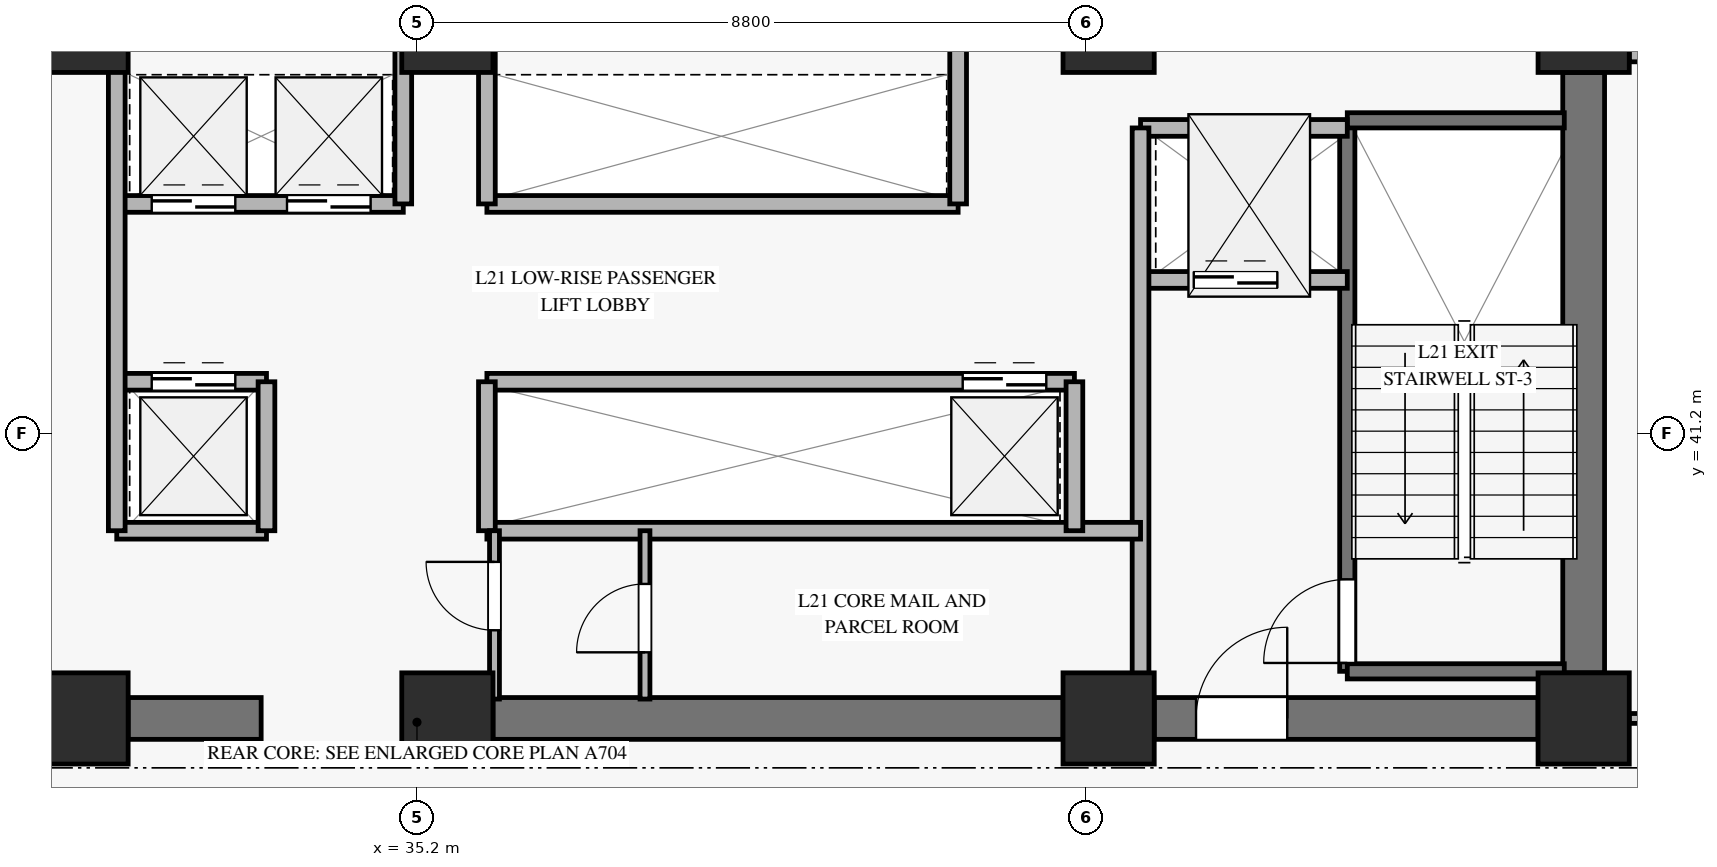
"""IFC4 building model, lengths in metres.
Left out: names, types, materials, properties, quantities, classifications, styles, units other than length and angle.
Written with IfcOpenShell. Run it as: python <this file> out.ifc"""

import sys

from ifc_helpers import new_model, si_unit, direction, frame, frame_2d, origin, origin_2d, place, context, subcontext, project, spatial, rectangle, extrude, source, transform, mapped, element, fill, save


model = new_model("IFC4")
c1 = context("Model", 3, precision=1e-05, world=origin(), true_north=direction((0.0, 1.0)))
c2 = subcontext(c1, "Body", "Model", "MODEL_VIEW")
j1 = project(units=[si_unit("LENGTHUNIT", "METRE"), si_unit("PLANEANGLEUNIT", "RADIAN")], contexts=[c1])
p1 = place(None, origin())
s1 = spatial("IfcSite", under=j1, at=p1, CompositionType="ELEMENT")
p2 = place(p1, origin())
s2 = spatial("IfcBuilding", under=s1, at=p2, CompositionType="ELEMENT")
p3 = place(p2, frame((0.0, 0.0, 87.4)))
s3 = spatial("IfcBuildingStorey", under=s2, at=p3, CompositionType="ELEMENT", Elevation=87.4)
m1 = source(origin(), c2, "Body", "SweptSolid", [
    extrude(rectangle(XDim=1.2, YDim=1.2, at=origin_2d()), origin(), (0.0, 0.0, 1.0), 3.68),
])
for number, where, z_axis, x_axis in (
    (1, (30.8, 37.45, 0.0), (0.0, 0.0, 1.0), (1.0, 0.0, 0.0)),
    (2, (30.8, 46.55, 0.0), (0.0, 0.0, 1.0), (1.0, 0.0, 0.0)),
    (3, (35.6, 37.45, 0.0), (0.0, 0.0, 1.0), (1.0, 0.0, 0.0)),
    (4, (35.6, 46.55, 0.0), (0.0, 0.0, 1.0), (1.0, 0.0, 0.0)),
    (5, (44.3, 37.45, 0.0), (0.0, 0.0, 1.0), (1.0, 0.0, 0.0)),
    (6, (44.3, 46.55, 0.0), (0.0, 0.0, 1.0), (1.0, 0.0, 0.0)),
    (7, (50.55, 37.45, 0.0), (0.0, 0.0, 1.0), (1.0, 0.0, 0.0)),
    (8, (50.55, 46.55, 0.0), (0.0, 0.0, 1.0), (1.0, 0.0, 0.0)),
):
    element("IfcColumn", number, at=place(p3, frame(where, z_axis=z_axis, x_axis=x_axis)), inside=s3, PredefinedType="PILASTER", context=c2, shape_type="MappedRepresentation", body=[
        mapped(m1, transform((0.0, 0.0, 0.0), x_axis=(1.0, 0.0, 0.0), y_axis=(0.0, 1.0, 0.0), z_axis=(0.0, 0.0, 1.0), scale=1.0)),
    ])
p4 = place(p3, frame((31.4, 37.45, 0.0), z_axis=(0.0, 0.0, 1.0), x_axis=(1.0, 0.0, 0.0)))
e9 = element("IfcWall", 9, at=p4, inside=s3, PredefinedType="SHEAR", context=c2, shape_type="SweptSolid", body=[
    extrude(rectangle(XDim=1.75, YDim=0.55, at=frame_2d((0.875, 0.0))), origin(), (0.0, 0.0, 1.0), 3.68),
])
p5 = place(p3, frame((36.2, 37.45, 0.0), z_axis=(0.0, 0.0, 1.0), x_axis=(1.0, 0.0, 0.0)))
e10 = element("IfcWall", 10, at=p5, inside=s3, PredefinedType="SHEAR", context=c2, shape_type="SweptSolid", body=[
    extrude(rectangle(XDim=7.5, YDim=0.55, at=frame_2d((3.75, 0.0))), origin(), (0.0, 0.0, 1.0), 3.68),
])
p6 = place(p3, frame((44.9, 37.45, 0.0), z_axis=(0.0, 0.0, 1.0), x_axis=(1.0, 0.0, 0.0)))
e11 = element("IfcWall", 11, at=p6, inside=s3, PredefinedType="SHEAR", context=c2, shape_type="SweptSolid", body=[
    extrude(rectangle(XDim=5.05, YDim=0.55, at=frame_2d((2.525, 0.0))), origin(), (0.0, 0.0, 1.0), 3.68),
])
p7 = place(p6, frame((0.55, 0.0, 0.0)))
e12 = element("IfcOpeningElement", 12, at=p7, cuts=e11, PredefinedType="OPENING", context=c2, shape_type="SweptSolid", body=[
    extrude(rectangle(XDim=1.2, YDim=2.15, at=frame_2d((0.6, 1.075))), frame((0.0, 0.285, 0.0), z_axis=(0.0, -1.0, 0.0), x_axis=(1.0, 0.0, 0.0)), (0.0, 0.0, 1.0), 0.57),
])
p8 = place(p3, frame((50.55, 38.05, 0.0), z_axis=(0.0, 0.0, 1.0), x_axis=(0.0, 1.0, 0.0)))
e13 = element("IfcWall", 13, at=p8, inside=s3, PredefinedType="SHEAR", context=c2, shape_type="SweptSolid", body=[
    extrude(rectangle(XDim=7.9, YDim=0.55, at=frame_2d((3.95, 0.0))), origin(), (0.0, 0.0, 1.0), 3.68),
])
p9 = place(p3, frame((51.15, 46.25, 0.0), z_axis=(0.0, 0.0, 1.0), x_axis=(1.0, 0.0, 0.0)))
e14 = element("IfcWall", 14, at=p9, inside=s3, PredefinedType="SOLIDWALL", context=c2, shape_type="SweptSolid", body=[
    extrude(rectangle(XDim=11.406, YDim=0.32, at=frame_2d((5.703, 0.0))), origin(), (0.0, 0.0, 1.0), 3.16),
])
p10 = place(p9, frame((4.903, 0.0, 0.45)))
e15 = element("IfcOpeningElement", 15, at=p10, cuts=e14, PredefinedType="OPENING", context=c2, shape_type="SweptSolid", body=[
    extrude(rectangle(XDim=1.6, YDim=2.0, at=frame_2d((0.8, 1.0))), frame((0.0, 0.17, 0.0), z_axis=(0.0, -1.0, 0.0), x_axis=(1.0, 0.0, 0.0)), (0.0, 0.0, 1.0), 0.34),
])
p11 = place(p3, frame((47.44, 38.07, 0.0), z_axis=(0.0, 0.0, 1.0), x_axis=(0.0, 1.0, 0.0)))
e16 = element("IfcWall", 16, at=p11, inside=s3, PredefinedType="SOLIDWALL", context=c2, shape_type="SweptSolid", body=[
    extrude(rectangle(XDim=7.25, YDim=0.2, at=frame_2d((3.625, 0.0))), origin(), (0.0, 0.0, 1.0), 3.9),
])
p12 = place(p11, frame((0.11, 0.0, 0.0)))
e17 = element("IfcOpeningElement", 17, at=p12, cuts=e16, PredefinedType="OPENING", context=c2, shape_type="SweptSolid", body=[
    extrude(rectangle(XDim=1.1, YDim=2.15, at=frame_2d((0.55, 1.075))), frame((0.0, 0.11, 0.0), z_axis=(0.0, -1.0, 0.0), x_axis=(1.0, 0.0, 0.0)), (0.0, 0.0, 1.0), 0.22),
])
for number, where, z_axis, x_axis in (
    (18, (47.44, 45.32, 0.0), (0.0, 0.0, 1.0), (1.0, 0.0, 0.0)),
    (19, (47.44, 38.07, 0.0), (0.0, 0.0, 1.0), (1.0, 0.0, 0.0)),
):
    element("IfcWall", number, at=place(p3, frame(where, z_axis=z_axis, x_axis=x_axis)), inside=s3, PredefinedType="SOLIDWALL", context=c2, shape_type="SweptSolid", body=[
        extrude(rectangle(XDim=2.855, YDim=0.2, at=frame_2d((1.427, 0.0))), origin(), (0.0, 0.0, 1.0), 3.9),
    ])
p13 = place(p3, frame((44.72, 43.22, 0.0), z_axis=(0.0, 0.0, 1.0), x_axis=(1.0, 0.0, 0.0)))
e20 = element("IfcWall", 20, at=p13, inside=s3, PredefinedType="SOLIDWALL", context=c2, shape_type="SweptSolid", body=[
    extrude(rectangle(XDim=2.72, YDim=0.22, at=frame_2d((1.36, 0.0))), origin(), (0.0, 0.0, 1.0), 3.68),
])
p14 = place(p13, frame((0.7, 0.0, 0.0)))
e21 = element("IfcOpeningElement", 21, at=p14, cuts=e20, PredefinedType="OPENING", context=c2, shape_type="SweptSolid", body=[
    extrude(rectangle(XDim=1.1, YDim=2.2, at=frame_2d((0.55, 1.1))), frame((0.0, 0.12, 0.0), z_axis=(0.0, -1.0, 0.0), x_axis=(1.0, 0.0, 0.0)), (0.0, 0.0, 1.0), 0.24),
])
p15 = place(p3, frame((44.72, 45.22, 0.0), z_axis=(0.0, 0.0, 1.0), x_axis=(1.0, 0.0, 0.0)))
e22 = element("IfcWall", 22, at=p15, inside=s3, PredefinedType="SOLIDWALL", context=c2, shape_type="SweptSolid", body=[
    extrude(rectangle(XDim=2.72, YDim=0.22, at=frame_2d((1.36, 0.0))), origin(), (0.0, 0.0, 1.0), 3.68),
])
p16 = place(p3, frame((44.72, 37.705, 0.0), z_axis=(0.0, 0.0, 1.0), x_axis=(0.0, 1.0, 0.0)))
e23 = element("IfcWall", 23, at=p16, inside=s3, PredefinedType="SOLIDWALL", context=c2, shape_type="SweptSolid", body=[
    extrude(rectangle(XDim=7.515, YDim=0.22, at=frame_2d((3.757, 0.0))), origin(), (0.0, 0.0, 1.0), 3.68),
])
p17 = place(p3, frame((31.25, 44.22, 0.0), z_axis=(0.0, 0.0, 1.0), x_axis=(1.0, 0.0, 0.0)))
e24 = element("IfcWall", 24, at=p17, inside=s3, PredefinedType="SOLIDWALL", context=c2, shape_type="SweptSolid", body=[
    extrude(rectangle(XDim=3.77, YDim=0.22, at=frame_2d((1.885, 0.0))), origin(), (0.0, 0.0, 1.0), 3.68),
])
p18 = place(p17, frame((0.46, 0.0, 0.0)))
e25 = element("IfcOpeningElement", 25, at=p18, cuts=e24, PredefinedType="OPENING", context=c2, shape_type="SweptSolid", body=[
    extrude(rectangle(XDim=1.1, YDim=2.2, at=frame_2d((0.55, 1.1))), frame((0.0, 0.12, 0.0), z_axis=(0.0, -1.0, 0.0), x_axis=(1.0, 0.0, 0.0)), (0.0, 0.0, 1.0), 0.24),
])
p19 = place(p17, frame((2.24, 0.0, 0.0)))
e26 = element("IfcOpeningElement", 26, at=p19, cuts=e24, PredefinedType="OPENING", context=c2, shape_type="SweptSolid", body=[
    extrude(rectangle(XDim=1.1, YDim=2.2, at=frame_2d((0.55, 1.1))), frame((0.0, 0.12, 0.0), z_axis=(0.0, -1.0, 0.0), x_axis=(1.0, 0.0, 0.0)), (0.0, 0.0, 1.0), 0.24),
])
p20 = place(p3, frame((36.12, 44.22, 0.0), z_axis=(0.0, 0.0, 1.0), x_axis=(1.0, 0.0, 0.0)))
e27 = element("IfcWall", 27, at=p20, inside=s3, PredefinedType="SOLIDWALL", context=c2, shape_type="SweptSolid", body=[
    extrude(rectangle(XDim=6.2, YDim=0.22, at=frame_2d((3.1, 0.0))), origin(), (0.0, 0.0, 1.0), 3.68),
])
for number, where, z_axis, x_axis in (
    (28, (35.02, 44.22, 0.0), (0.0, 0.0, 1.0), (0.0, 1.0, 0.0)),
    (29, (36.12, 44.22, 0.0), (0.0, 0.0, 1.0), (0.0, 1.0, 0.0)),
    (30, (42.32, 44.22, 0.0), (0.0, 0.0, 1.0), (0.0, 1.0, 0.0)),
):
    element("IfcWall", number, at=place(p3, frame(where, z_axis=z_axis, x_axis=x_axis)), inside=s3, PredefinedType="SOLIDWALL", context=c2, shape_type="SweptSolid", body=[
        extrude(rectangle(XDim=2.075, YDim=0.22, at=frame_2d((1.038, 0.0))), origin(), (0.0, 0.0, 1.0), 3.68),
    ])
p21 = place(p3, frame((31.25, 41.88, 0.0), z_axis=(0.0, 0.0, 1.0), x_axis=(1.0, 0.0, 0.0)))
e31 = element("IfcWall", 31, at=p21, inside=s3, PredefinedType="SOLIDWALL", context=c2, shape_type="SweptSolid", body=[
    extrude(rectangle(XDim=1.97, YDim=0.22, at=frame_2d((0.985, 0.0))), origin(), (0.0, 0.0, 1.0), 3.68),
])
p22 = place(p21, frame((0.46, 0.0, 0.0)))
e32 = element("IfcOpeningElement", 32, at=p22, cuts=e31, PredefinedType="OPENING", context=c2, shape_type="SweptSolid", body=[
    extrude(rectangle(XDim=1.1, YDim=2.2, at=frame_2d((0.55, 1.1))), frame((0.0, 0.12, 0.0), z_axis=(0.0, -1.0, 0.0), x_axis=(1.0, 0.0, 0.0)), (0.0, 0.0, 1.0), 0.24),
])
p23 = place(p3, frame((36.12, 41.88, 0.0), z_axis=(0.0, 0.0, 1.0), x_axis=(1.0, 0.0, 0.0)))
e33 = element("IfcWall", 33, at=p23, inside=s3, PredefinedType="SOLIDWALL", context=c2, shape_type="SweptSolid", body=[
    extrude(rectangle(XDim=7.73, YDim=0.22, at=frame_2d((3.865, 0.0))), origin(), (0.0, 0.0, 1.0), 3.68),
])
p24 = place(p23, frame((6.26, 0.0, 0.0)))
e34 = element("IfcOpeningElement", 34, at=p24, cuts=e33, PredefinedType="OPENING", context=c2, shape_type="SweptSolid", body=[
    extrude(rectangle(XDim=1.1, YDim=2.2, at=frame_2d((0.55, 1.1))), frame((0.0, 0.12, 0.0), z_axis=(0.0, -1.0, 0.0), x_axis=(1.0, 0.0, 0.0)), (0.0, 0.0, 1.0), 0.24),
])
p25 = place(p3, frame((31.25, 39.92, 0.0), z_axis=(0.0, 0.0, 1.0), x_axis=(1.0, 0.0, 0.0)))
e35 = element("IfcWall", 35, at=p25, inside=s3, PredefinedType="SOLIDWALL", context=c2, shape_type="SweptSolid", body=[
    extrude(rectangle(XDim=1.97, YDim=0.22, at=frame_2d((0.985, 0.0))), origin(), (0.0, 0.0, 1.0), 3.68),
])
p26 = place(p3, frame((33.22, 39.92, 0.0), z_axis=(0.0, 0.0, 1.0), x_axis=(0.0, 1.0, 0.0)))
e36 = element("IfcWall", 36, at=p26, inside=s3, PredefinedType="SOLIDWALL", context=c2, shape_type="SweptSolid", body=[
    extrude(rectangle(XDim=1.96, YDim=0.22, at=frame_2d((0.98, 0.0))), origin(), (0.0, 0.0, 1.0), 3.68),
])
p27 = place(p3, frame((36.12, 39.92, 0.0), z_axis=(0.0, 0.0, 1.0), x_axis=(1.0, 0.0, 0.0)))
e37 = element("IfcWall", 37, at=p27, inside=s3, PredefinedType="SOLIDWALL", context=c2, shape_type="SweptSolid", body=[
    extrude(rectangle(XDim=8.6, YDim=0.22, at=frame_2d((4.3, 0.0))), origin(), (0.0, 0.0, 1.0), 2.965),
])
p28 = place(p3, frame((36.12, 39.92, 0.0), z_axis=(0.0, 0.0, 1.0), x_axis=(0.0, 1.0, 0.0)))
e38 = element("IfcWall", 38, at=p28, inside=s3, PredefinedType="SOLIDWALL", context=c2, shape_type="SweptSolid", body=[
    extrude(rectangle(XDim=1.96, YDim=0.22, at=frame_2d((0.98, 0.0))), origin(), (0.0, 0.0, 1.0), 3.68),
])
p29 = place(p3, frame((31.25, 39.92, 0.0), z_axis=(0.0, 0.0, 1.0), x_axis=(0.0, 1.0, 0.0)))
e39 = element("IfcWall", 39, at=p29, inside=s3, PredefinedType="SOLIDWALL", context=c2, shape_type="SweptSolid", body=[
    extrude(rectangle(XDim=6.375, YDim=0.22, at=frame_2d((3.188, 0.0))), origin(), (0.0, 0.0, 1.0), 3.68),
])
p30 = place(p3, frame((43.85, 39.92, 0.0), z_axis=(0.0, 0.0, 1.0), x_axis=(0.0, 1.0, 0.0)))
e40 = element("IfcWall", 40, at=p30, inside=s3, PredefinedType="SOLIDWALL", context=c2, shape_type="SweptSolid", body=[
    extrude(rectangle(XDim=1.96, YDim=0.22, at=frame_2d((0.98, 0.0))), origin(), (0.0, 0.0, 1.0), 3.68),
])
p31 = place(p3, frame((36.22, 37.705, 0.0), z_axis=(0.0, 0.0, 1.0), x_axis=(0.0, 1.0, 0.0)))
e41 = element("IfcWall", 41, at=p31, inside=s3, PredefinedType="PARTITIONING", context=c2, shape_type="SweptSolid", body=[
    extrude(rectangle(XDim=2.215, YDim=0.13, at=frame_2d((1.107, 0.0))), origin(), (0.0, 0.0, 1.0), 3.68),
])
p32 = place(p31, frame((0.905, 0.0, 0.0)))
e42 = element("IfcOpeningElement", 42, at=p32, cuts=e41, PredefinedType="OPENING", context=c2, shape_type="SweptSolid", body=[
    extrude(rectangle(XDim=0.9, YDim=2.1, at=frame_2d((0.45, 1.05))), frame((0.0, 0.075, 0.0), z_axis=(0.0, -1.0, 0.0), x_axis=(1.0, 0.0, 0.0)), (0.0, 0.0, 1.0), 0.15),
])
p33 = place(p3, frame((38.2, 37.705, 0.0), z_axis=(0.0, 0.0, 1.0), x_axis=(0.0, 1.0, 0.0)))
e43 = element("IfcWall", 43, at=p33, inside=s3, PredefinedType="PARTITIONING", context=c2, shape_type="SweptSolid", body=[
    extrude(rectangle(XDim=2.215, YDim=0.13, at=frame_2d((1.107, 0.0))), origin(), (0.0, 0.0, 1.0), 3.68),
])
p34 = place(p33, frame((0.615, 0.0, 0.0)))
e44 = element("IfcOpeningElement", 44, at=p34, cuts=e43, PredefinedType="OPENING", context=c2, shape_type="SweptSolid", body=[
    extrude(rectangle(XDim=0.9, YDim=2.1, at=frame_2d((0.45, 1.05))), frame((0.0, 0.075, 0.0), z_axis=(0.0, -1.0, 0.0), x_axis=(1.0, 0.0, 0.0)), (0.0, 0.0, 1.0), 0.15),
])
p35 = place(p3, frame((51.15, 37.45, 0.0), z_axis=(0.0, 0.0, 1.0), x_axis=(1.0, 0.0, 0.0)))
e45 = element("IfcWall", 45, at=p35, inside=s3, PredefinedType="PARTITIONING", context=c2, shape_type="SweptSolid", body=[
    extrude(rectangle(XDim=14.976, YDim=0.13, at=frame_2d((7.488, 0.0))), origin(), (0.0, 0.0, 1.0), 3.165),
])
p36 = place(p35, frame((0.5, 0.0, 0.0)))
e46 = element("IfcOpeningElement", 46, at=p36, cuts=e45, PredefinedType="OPENING", context=c2, shape_type="SweptSolid", body=[
    extrude(rectangle(XDim=0.9, YDim=2.1, at=frame_2d((0.45, 1.05))), frame((0.0, 0.075, 0.0), z_axis=(0.0, -1.0, 0.0), x_axis=(1.0, 0.0, 0.0)), (0.0, 0.0, 1.0), 0.15),
])
p37 = place(p35, frame((10.923, 0.0, 0.0)))
e47 = element("IfcOpeningElement", 47, at=p37, cuts=e45, PredefinedType="OPENING", context=c2, shape_type="SweptSolid", body=[
    extrude(rectangle(XDim=0.95, YDim=2.1, at=frame_2d((0.475, 1.05))), frame((0.0, 0.075, 0.0), z_axis=(0.0, -1.0, 0.0), x_axis=(1.0, 0.0, 0.0)), (0.0, 0.0, 1.0), 0.15),
])
m2 = source(origin(), c2, "Body", "SweptSolid", [
    extrude(rectangle(XDim=1.1, YDim=2.15, at=frame_2d((0.55, 1.075))), frame((0.0, 0.025, 0.0), z_axis=(0.0, -1.0, 0.0), x_axis=(1.0, 0.0, 0.0)), (0.0, 0.0, 1.0), 0.05),
])
p38 = place(p12, origin())
e48 = element("IfcDoor", 48, at=p38, inside=s3, OperationType="SINGLE_SWING_LEFT", PredefinedType="DOOR", context=c2, shape_type="MappedRepresentation", body=[
    mapped(m2, transform((0.0, 0.0, 0.0), x_axis=(1.0, 0.0, 0.0), y_axis=(0.0, 1.0, 0.0), z_axis=(0.0, 0.0, 1.0), scale=1.0)),
])
fill(e17, e48)
m3 = source(origin(), c2, "Body", "SweptSolid", [
    extrude(rectangle(XDim=1.1, YDim=2.2, at=frame_2d((0.55, 1.1))), frame((0.0, 0.025, 0.0), z_axis=(0.0, -1.0, 0.0), x_axis=(1.0, 0.0, 0.0)), (0.0, 0.0, 1.0), 0.05),
])
p39 = place(p14, origin())
e49 = element("IfcDoor", 49, at=p39, inside=s3, OperationType="SLIDING_TO_LEFT", PredefinedType="DOOR", context=c2, shape_type="MappedRepresentation", body=[
    mapped(m3, transform((0.0, 0.0, 0.0), x_axis=(1.0, 0.0, 0.0), y_axis=(0.0, 1.0, 0.0), z_axis=(0.0, 0.0, 1.0), scale=1.0)),
])
fill(e21, e49)
m4 = source(origin(), c2, "Body", "SweptSolid", [
    extrude(rectangle(XDim=1.2, YDim=2.15, at=frame_2d((0.6, 1.075))), frame((0.0, 0.025, 0.0), z_axis=(0.0, -1.0, 0.0), x_axis=(1.0, 0.0, 0.0)), (0.0, 0.0, 1.0), 0.05),
])
p40 = place(p7, origin())
e50 = element("IfcDoor", 50, at=p40, inside=s3, OperationType="SINGLE_SWING_RIGHT", PredefinedType="DOOR", context=c2, shape_type="MappedRepresentation", body=[
    mapped(m4, transform((0.0, 0.0, 0.0), x_axis=(1.0, 0.0, 0.0), y_axis=(0.0, 1.0, 0.0), z_axis=(0.0, 0.0, 1.0), scale=1.0)),
])
fill(e12, e50)
p41 = place(p18, origin())
e51 = element("IfcDoor", 51, at=p41, inside=s3, OperationType="SLIDING_TO_LEFT", PredefinedType="DOOR", context=c2, shape_type="MappedRepresentation", body=[
    mapped(m3, transform((0.0, 0.0, 0.0), x_axis=(1.0, 0.0, 0.0), y_axis=(0.0, 1.0, 0.0), z_axis=(0.0, 0.0, 1.0), scale=1.0)),
])
fill(e25, e51)
p42 = place(p19, origin())
e52 = element("IfcDoor", 52, at=p42, inside=s3, OperationType="SLIDING_TO_LEFT", PredefinedType="DOOR", context=c2, shape_type="MappedRepresentation", body=[
    mapped(m3, transform((0.0, 0.0, 0.0), x_axis=(1.0, 0.0, 0.0), y_axis=(0.0, 1.0, 0.0), z_axis=(0.0, 0.0, 1.0), scale=1.0)),
])
fill(e26, e52)
p43 = place(p22, origin())
e53 = element("IfcDoor", 53, at=p43, inside=s3, OperationType="SLIDING_TO_LEFT", PredefinedType="DOOR", context=c2, shape_type="MappedRepresentation", body=[
    mapped(m3, transform((0.0, 0.0, 0.0), x_axis=(1.0, 0.0, 0.0), y_axis=(0.0, 1.0, 0.0), z_axis=(0.0, 0.0, 1.0), scale=1.0)),
])
fill(e32, e53)
p44 = place(p24, origin())
e54 = element("IfcDoor", 54, at=p44, inside=s3, OperationType="SLIDING_TO_LEFT", PredefinedType="DOOR", context=c2, shape_type="MappedRepresentation", body=[
    mapped(m3, transform((0.0, 0.0, 0.0), x_axis=(1.0, 0.0, 0.0), y_axis=(0.0, 1.0, 0.0), z_axis=(0.0, 0.0, 1.0), scale=1.0)),
])
fill(e34, e54)
m5 = source(origin(), c2, "Body", "SweptSolid", [
    extrude(rectangle(XDim=0.9, YDim=2.1, at=frame_2d((0.45, 1.05))), frame((0.0, 0.025, 0.0), z_axis=(0.0, -1.0, 0.0), x_axis=(1.0, 0.0, 0.0)), (0.0, 0.0, 1.0), 0.05),
])
p45 = place(p32, origin())
e55 = element("IfcDoor", 55, at=p45, inside=s3, OperationType="SINGLE_SWING_RIGHT", PredefinedType="DOOR", context=c2, shape_type="MappedRepresentation", body=[
    mapped(m5, transform((0.0, 0.0, 0.0), x_axis=(1.0, 0.0, 0.0), y_axis=(0.0, 1.0, 0.0), z_axis=(0.0, 0.0, 1.0), scale=1.0)),
])
fill(e42, e55)
p46 = place(p34, origin())
e56 = element("IfcDoor", 56, at=p46, inside=s3, OperationType="SINGLE_SWING_LEFT", PredefinedType="DOOR", context=c2, shape_type="MappedRepresentation", body=[
    mapped(m5, transform((0.0, 0.0, 0.0), x_axis=(1.0, 0.0, 0.0), y_axis=(0.0, 1.0, 0.0), z_axis=(0.0, 0.0, 1.0), scale=1.0)),
])
fill(e44, e56)
save(model, sys.argv[1])
